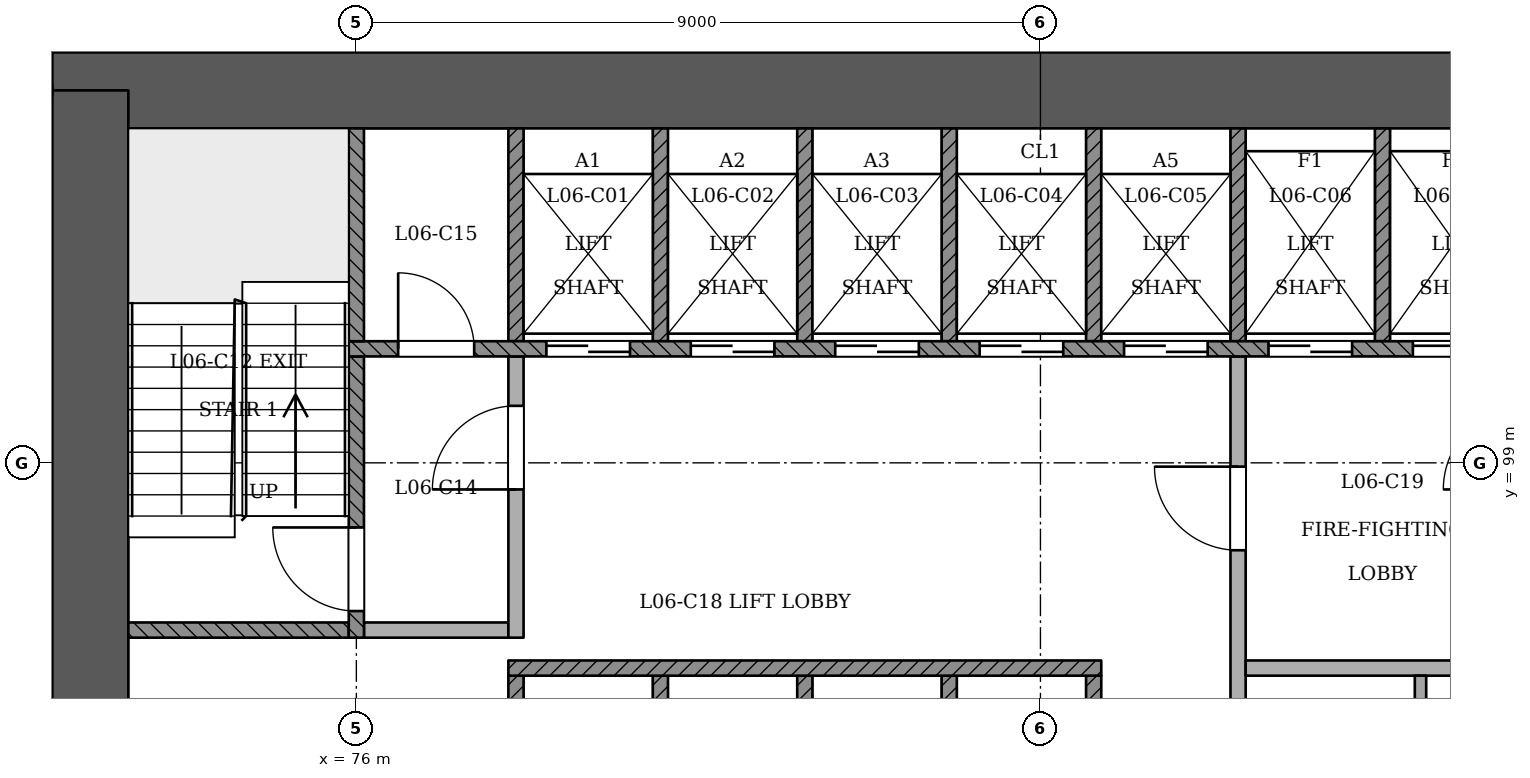
"""IFC4 building model, lengths in metres.
Left out: names, types, materials, properties, quantities, classifications, styles, units other than length and angle.
Written with IfcOpenShell. Run it as: python <this file> out.ifc"""

import sys

from ifc_helpers import new_model, si_unit, direction, frame, frame_2d, origin, place, context, subcontext, project, spatial, rectangle, extrude, element, fill, save


model = new_model("IFC4")
c1 = context("Model", 3, precision=1e-05, world=origin(), true_north=direction((0.0, 1.0)))
c2 = subcontext(c1, "Body", "Model", "MODEL_VIEW")
j1 = project(units=[si_unit("LENGTHUNIT", "METRE"), si_unit("PLANEANGLEUNIT", "RADIAN")], contexts=[c1])
p1 = place(None, origin())
s1 = spatial("IfcSite", under=j1, at=p1, CompositionType="ELEMENT")
p2 = place(p1, origin())
s2 = spatial("IfcBuilding", under=s1, at=p2, CompositionType="ELEMENT")
p3 = place(p2, frame((0.0, 0.0, 30.6)))
s3 = spatial("IfcBuildingStorey", under=s2, at=p3, CompositionType="ELEMENT", Elevation=30.6)
p4 = place(p3, frame((97.5, 103.9, 0.0), z_axis=(0.0, 0.0, 1.0), x_axis=(-1.0, 0.0, 0.0)))
e1 = element("IfcWall", 1, at=p4, inside=s3, PredefinedType="SHEAR", context=c2, shape_type="SweptSolid", body=[
    extrude(rectangle(XDim=25.5, YDim=1.0, at=frame_2d((12.75, 0.0))), origin(), (0.0, 0.0, 1.0), 3.6),
])
p5 = place(p3, frame((72.5, 103.9, 0.0), z_axis=(0.0, 0.0, 1.0), x_axis=(0.0, -1.0, 0.0)))
e2 = element("IfcWall", 2, at=p5, inside=s3, PredefinedType="SHEAR", context=c2, shape_type="SweptSolid", body=[
    extrude(rectangle(XDim=11.5, YDim=1.0, at=frame_2d((5.75, 0.0))), origin(), (0.0, 0.0, 1.0), 3.6),
])
p6 = place(p3, frame((61.273, 96.374, 0.0), z_axis=(0.0, 0.0, 1.0), x_axis=(0.5000018851, -0.866024315419, 0.0)))
e3 = element("IfcWall", 3, at=p6, inside=s3, PredefinedType="PARTITIONING", context=c2, shape_type="SweptSolid", body=[
    extrude(rectangle(XDim=45.0, YDim=0.15, at=frame_2d((22.5, 0.0))), origin(), (0.0, 0.0, 1.0), 2.7),
])
p7 = place(p6, frame((2.829, 0.0, 0.0)))
e4 = element("IfcOpeningElement", 4, at=p7, cuts=e3, PredefinedType="OPENING", context=c2, shape_type="SweptSolid", body=[
    extrude(rectangle(XDim=1.1, YDim=2.1, at=frame_2d((0.55, 1.05))), frame((0.0, 0.085, 0.0), z_axis=(0.0, -1.0, 0.0), x_axis=(1.0, 0.0, 0.0)), (0.0, 0.0, 1.0), 0.171),
])
p8 = place(p6, frame((7.3, 0.0, 0.0)))
e5 = element("IfcOpeningElement", 5, at=p8, cuts=e3, PredefinedType="OPENING", context=c2, shape_type="SweptSolid", body=[
    extrude(rectangle(XDim=1.2, YDim=2.1, at=frame_2d((0.6, 1.05))), frame((0.0, 0.085, 0.0), z_axis=(0.0, -1.0, 0.0), x_axis=(1.0, 0.0, 0.0)), (0.0, 0.0, 1.0), 0.171),
])
p9 = place(p6, frame((14.22, 0.0, 0.0)))
e6 = element("IfcOpeningElement", 6, at=p9, cuts=e3, PredefinedType="OPENING", context=c2, shape_type="SweptSolid", body=[
    extrude(rectangle(XDim=1.0, YDim=2.1, at=frame_2d((0.5, 1.05))), frame((0.0, 0.085, 0.0), z_axis=(0.0, -1.0, 0.0), x_axis=(1.0, 0.0, 0.0)), (0.0, 0.0, 1.0), 0.171),
])
p10 = place(p6, frame((20.895, 0.0, 0.0)))
e7 = element("IfcOpeningElement", 7, at=p10, cuts=e3, PredefinedType="OPENING", context=c2, shape_type="SweptSolid", body=[
    extrude(rectangle(XDim=1.0, YDim=2.1, at=frame_2d((0.5, 1.05))), frame((0.0, 0.085, 0.0), z_axis=(0.0, -1.0, 0.0), x_axis=(1.0, 0.0, 0.0)), (0.0, 0.0, 1.0), 0.171),
])
p11 = place(p6, frame((24.25, 0.0, 0.0)))
e8 = element("IfcOpeningElement", 8, at=p11, cuts=e3, PredefinedType="OPENING", context=c2, shape_type="SweptSolid", body=[
    extrude(rectangle(XDim=1.0, YDim=2.1, at=frame_2d((0.5, 1.05))), frame((0.0, 0.085, 0.0), z_axis=(0.0, -1.0, 0.0), x_axis=(1.0, 0.0, 0.0)), (0.0, 0.0, 1.0), 0.171),
])
p12 = place(p6, frame((29.78, 0.0, 0.0)))
e9 = element("IfcOpeningElement", 9, at=p12, cuts=e3, PredefinedType="OPENING", context=c2, shape_type="SweptSolid", body=[
    extrude(rectangle(XDim=1.0, YDim=2.1, at=frame_2d((0.5, 1.05))), frame((0.0, 0.085, 0.0), z_axis=(0.0, -1.0, 0.0), x_axis=(1.0, 0.0, 0.0)), (0.0, 0.0, 1.0), 0.171),
])
p13 = place(p6, frame((34.3, 0.0, 0.0)))
e10 = element("IfcOpeningElement", 10, at=p13, cuts=e3, PredefinedType="OPENING", context=c2, shape_type="SweptSolid", body=[
    extrude(rectangle(XDim=1.2, YDim=2.1, at=frame_2d((0.6, 1.05))), frame((0.0, 0.085, 0.0), z_axis=(0.0, -1.0, 0.0), x_axis=(1.0, 0.0, 0.0)), (0.0, 0.0, 1.0), 0.171),
])
p14 = place(p6, frame((41.22, 0.0, 0.0)))
e11 = element("IfcOpeningElement", 11, at=p14, cuts=e3, PredefinedType="OPENING", context=c2, shape_type="SweptSolid", body=[
    extrude(rectangle(XDim=1.0, YDim=2.1, at=frame_2d((0.5, 1.05))), frame((0.0, 0.085, 0.0), z_axis=(0.0, -1.0, 0.0), x_axis=(1.0, 0.0, 0.0)), (0.0, 0.0, 1.0), 0.171),
])
p15 = place(p3, frame((86.227, 57.403, 0.0), z_axis=(0.0, 0.0, 1.0), x_axis=(0.5000018851, 0.866024315419, 0.0)))
e12 = element("IfcWall", 12, at=p15, inside=s3, PredefinedType="PARTITIONING", context=c2, shape_type="SweptSolid", body=[
    extrude(rectangle(XDim=45.0, YDim=0.15, at=frame_2d((22.5, 0.0))), origin(), (0.0, 0.0, 1.0), 2.7),
])
p16 = place(p15, frame((0.72, 0.0, 0.0)))
e13 = element("IfcOpeningElement", 13, at=p16, cuts=e12, PredefinedType="OPENING", context=c2, shape_type="SweptSolid", body=[
    extrude(rectangle(XDim=1.0, YDim=2.1, at=frame_2d((0.5, 1.05))), frame((0.0, 0.085, 0.0), z_axis=(0.0, -1.0, 0.0), x_axis=(1.0, 0.0, 0.0)), (0.0, 0.0, 1.0), 0.171),
])
p17 = place(p15, frame((5.22, 0.0, 0.0)))
e14 = element("IfcOpeningElement", 14, at=p17, cuts=e12, PredefinedType="OPENING", context=c2, shape_type="SweptSolid", body=[
    extrude(rectangle(XDim=1.0, YDim=2.1, at=frame_2d((0.5, 1.05))), frame((0.0, 0.085, 0.0), z_axis=(0.0, -1.0, 0.0), x_axis=(1.0, 0.0, 0.0)), (0.0, 0.0, 1.0), 0.171),
])
p18 = place(p15, frame((11.78, 0.0, 0.0)))
e15 = element("IfcOpeningElement", 15, at=p18, cuts=e12, PredefinedType="OPENING", context=c2, shape_type="SweptSolid", body=[
    extrude(rectangle(XDim=1.0, YDim=2.1, at=frame_2d((0.5, 1.05))), frame((0.0, 0.085, 0.0), z_axis=(0.0, -1.0, 0.0), x_axis=(1.0, 0.0, 0.0)), (0.0, 0.0, 1.0), 0.171),
])
p19 = place(p15, frame((14.22, 0.0, 0.0)))
e16 = element("IfcOpeningElement", 16, at=p19, cuts=e12, PredefinedType="OPENING", context=c2, shape_type="SweptSolid", body=[
    extrude(rectangle(XDim=1.0, YDim=2.1, at=frame_2d((0.5, 1.05))), frame((0.0, 0.085, 0.0), z_axis=(0.0, -1.0, 0.0), x_axis=(1.0, 0.0, 0.0)), (0.0, 0.0, 1.0), 0.171),
])
p20 = place(p15, frame((19.75, 0.0, 0.0)))
e17 = element("IfcOpeningElement", 17, at=p20, cuts=e12, PredefinedType="OPENING", context=c2, shape_type="SweptSolid", body=[
    extrude(rectangle(XDim=1.0, YDim=2.1, at=frame_2d((0.5, 1.05))), frame((0.0, 0.085, 0.0), z_axis=(0.0, -1.0, 0.0), x_axis=(1.0, 0.0, 0.0)), (0.0, 0.0, 1.0), 0.171),
])
p21 = place(p15, frame((23.105, 0.0, 0.0)))
e18 = element("IfcOpeningElement", 18, at=p21, cuts=e12, PredefinedType="OPENING", context=c2, shape_type="SweptSolid", body=[
    extrude(rectangle(XDim=1.0, YDim=2.1, at=frame_2d((0.5, 1.05))), frame((0.0, 0.085, 0.0), z_axis=(0.0, -1.0, 0.0), x_axis=(1.0, 0.0, 0.0)), (0.0, 0.0, 1.0), 0.171),
])
p22 = place(p15, frame((28.75, 0.0, 0.0)))
e19 = element("IfcOpeningElement", 19, at=p22, cuts=e12, PredefinedType="OPENING", context=c2, shape_type="SweptSolid", body=[
    extrude(rectangle(XDim=1.0, YDim=2.1, at=frame_2d((0.5, 1.05))), frame((0.0, 0.085, 0.0), z_axis=(0.0, -1.0, 0.0), x_axis=(1.0, 0.0, 0.0)), (0.0, 0.0, 1.0), 0.171),
])
p23 = place(p15, frame((32.105, 0.0, 0.0)))
e20 = element("IfcOpeningElement", 20, at=p23, cuts=e12, PredefinedType="OPENING", context=c2, shape_type="SweptSolid", body=[
    extrude(rectangle(XDim=1.0, YDim=2.1, at=frame_2d((0.5, 1.05))), frame((0.0, 0.085, 0.0), z_axis=(0.0, -1.0, 0.0), x_axis=(1.0, 0.0, 0.0)), (0.0, 0.0, 1.0), 0.171),
])
p24 = place(p15, frame((36.504, 0.0, 0.0)))
e21 = element("IfcOpeningElement", 21, at=p24, cuts=e12, PredefinedType="OPENING", context=c2, shape_type="SweptSolid", body=[
    extrude(rectangle(XDim=1.0, YDim=2.1, at=frame_2d((0.5, 1.05))), frame((0.0, 0.085, 0.0), z_axis=(0.0, -1.0, 0.0), x_axis=(1.0, 0.0, 0.0)), (0.0, 0.0, 1.0), 0.171),
])
p25 = place(p15, frame((38.654, 0.0, 0.0)))
e22 = element("IfcOpeningElement", 22, at=p25, cuts=e12, PredefinedType="OPENING", context=c2, shape_type="SweptSolid", body=[
    extrude(rectangle(XDim=1.0, YDim=2.1, at=frame_2d((0.5, 1.05))), frame((0.0, 0.085, 0.0), z_axis=(0.0, -1.0, 0.0), x_axis=(1.0, 0.0, 0.0)), (0.0, 0.0, 1.0), 0.171),
])
p26 = place(p15, frame((41.071, 0.0, 0.0)))
e23 = element("IfcOpeningElement", 23, at=p26, cuts=e12, PredefinedType="OPENING", context=c2, shape_type="SweptSolid", body=[
    extrude(rectangle(XDim=1.1, YDim=2.1, at=frame_2d((0.55, 1.05))), frame((0.0, 0.085, 0.0), z_axis=(0.0, -1.0, 0.0), x_axis=(1.0, 0.0, 0.0)), (0.0, 0.0, 1.0), 0.171),
])
for number, where, z_axis, x_axis in (
    (24, (78.1, 93.4, 0.0), (0.0, 0.0, 1.0), (0.0, 1.0, 0.0)),
    (25, (80.0, 93.4, 0.0), (0.0, 0.0, 1.0), (0.0, 1.0, 0.0)),
    (26, (81.9, 93.4, 0.0), (0.0, 0.0, 1.0), (0.0, 1.0, 0.0)),
    (27, (83.8, 93.4, 0.0), (0.0, 0.0, 1.0), (0.0, 1.0, 0.0)),
    (28, (85.7, 93.4, 0.0), (0.0, 0.0, 1.0), (0.0, 1.0, 0.0)),
):
    element("IfcWall", number, at=place(p3, frame(where, z_axis=z_axis, x_axis=x_axis)), inside=s3, PredefinedType="SOLIDWALL", context=c2, shape_type="SweptSolid", body=[
        extrude(rectangle(XDim=2.8, YDim=0.2, at=frame_2d((1.4, 0.0))), origin(), (0.0, 0.0, 1.0), 3.1),
    ])
p27 = place(p3, frame((87.6, 93.4, 0.0), z_axis=(0.0, 0.0, 1.0), x_axis=(0.0, 1.0, 0.0)))
e29 = element("IfcWall", 29, at=p27, inside=s3, PredefinedType="PARTITIONING", context=c2, shape_type="SweptSolid", body=[
    extrude(rectangle(XDim=7.0, YDim=0.2, at=frame_2d((3.5, 0.0))), origin(), (0.0, 0.0, 1.0), 3.1),
])
p28 = place(p27, frame((4.45, 0.0, 0.0)))
e30 = element("IfcOpeningElement", 30, at=p28, cuts=e29, PredefinedType="OPENING", context=c2, shape_type="SweptSolid", body=[
    extrude(rectangle(XDim=1.1, YDim=2.1, at=frame_2d((0.55, 1.05))), frame((0.0, 0.11, 0.0), z_axis=(0.0, -1.0, 0.0), x_axis=(1.0, 0.0, 0.0)), (0.0, 0.0, 1.0), 0.221),
])
p29 = place(p3, frame((90.0, 93.4, 0.0), z_axis=(0.0, 0.0, 1.0), x_axis=(0.0, 1.0, 0.0)))
e31 = element("IfcWall", 31, at=p29, inside=s3, PredefinedType="PARTITIONING", context=c2, shape_type="SweptSolid", body=[
    extrude(rectangle(XDim=2.8, YDim=0.15, at=frame_2d((1.4, 0.0))), origin(), (0.0, 0.0, 1.0), 3.1),
])
p30 = place(p3, frame((78.0, 96.3, 0.0), z_axis=(0.0, 0.0, 1.0), x_axis=(1.0, 0.0, 0.0)))
e32 = element("IfcWall", 32, at=p30, inside=s3, PredefinedType="SOLIDWALL", context=c2, shape_type="SweptSolid", body=[
    extrude(rectangle(XDim=7.8, YDim=0.2, at=frame_2d((3.9, 0.0))), origin(), (0.0, 0.0, 1.0), 3.1),
])
p31 = place(p3, frame((87.7, 96.3, 0.0), z_axis=(0.0, 0.0, 1.0), x_axis=(1.0, 0.0, 0.0)))
e33 = element("IfcWall", 33, at=p31, inside=s3, PredefinedType="PARTITIONING", context=c2, shape_type="SweptSolid", body=[
    extrude(rectangle(XDim=3.6, YDim=0.2, at=frame_2d((1.8, 0.0))), origin(), (0.0, 0.0, 1.0), 3.1),
])
p32 = place(p3, frame((73.0, 96.8, 0.0), z_axis=(0.0, 0.0, 1.0), x_axis=(1.0, 0.0, 0.0)))
e34 = element("IfcWall", 34, at=p32, inside=s3, PredefinedType="SOLIDWALL", context=c2, shape_type="SweptSolid", body=[
    extrude(rectangle(XDim=2.9, YDim=0.2, at=frame_2d((1.45, 0.0))), origin(), (0.0, 0.0, 1.0), 3.1),
])
p33 = place(p3, frame((76.0, 96.7, 0.0), z_axis=(0.0, 0.0, 1.0), x_axis=(0.0, 1.0, 0.0)))
e35 = element("IfcWall", 35, at=p33, inside=s3, PredefinedType="SOLIDWALL", context=c2, shape_type="SweptSolid", body=[
    extrude(rectangle(XDim=3.7, YDim=0.2, at=frame_2d((1.85, 0.0))), origin(), (0.0, 0.0, 1.0), 3.1),
])
p34 = place(p33, frame((0.35, 0.0, 0.0)))
e36 = element("IfcOpeningElement", 36, at=p34, cuts=e35, PredefinedType="OPENING", context=c2, shape_type="SweptSolid", body=[
    extrude(rectangle(XDim=1.1, YDim=2.1, at=frame_2d((0.55, 1.05))), frame((0.0, 0.11, 0.0), z_axis=(0.0, -1.0, 0.0), x_axis=(1.0, 0.0, 0.0)), (0.0, 0.0, 1.0), 0.221),
])
p35 = place(p3, frame((76.1, 96.8, 0.0), z_axis=(0.0, 0.0, 1.0), x_axis=(1.0, 0.0, 0.0)))
e37 = element("IfcWall", 37, at=p35, inside=s3, PredefinedType="PARTITIONING", context=c2, shape_type="SweptSolid", body=[
    extrude(rectangle(XDim=1.9, YDim=0.2, at=frame_2d((0.95, 0.0))), origin(), (0.0, 0.0, 1.0), 3.1),
])
p36 = place(p3, frame((78.1, 96.7, 0.0), z_axis=(0.0, 0.0, 1.0), x_axis=(0.0, 1.0, 0.0)))
e38 = element("IfcWall", 38, at=p36, inside=s3, PredefinedType="PARTITIONING", context=c2, shape_type="SweptSolid", body=[
    extrude(rectangle(XDim=3.7, YDim=0.2, at=frame_2d((1.85, 0.0))), origin(), (0.0, 0.0, 1.0), 3.1),
])
p37 = place(p36, frame((1.95, 0.0, 0.0)))
e39 = element("IfcOpeningElement", 39, at=p37, cuts=e38, PredefinedType="OPENING", context=c2, shape_type="SweptSolid", body=[
    extrude(rectangle(XDim=1.1, YDim=2.1, at=frame_2d((0.55, 1.05))), frame((0.0, 0.11, 0.0), z_axis=(0.0, -1.0, 0.0), x_axis=(1.0, 0.0, 0.0)), (0.0, 0.0, 1.0), 0.221),
])
p38 = place(p3, frame((75.9, 100.5, 0.0), z_axis=(0.0, 0.0, 1.0), x_axis=(1.0, 0.0, 0.0)))
e40 = element("IfcWall", 40, at=p38, inside=s3, PredefinedType="SOLIDWALL", context=c2, shape_type="SweptSolid", body=[
    extrude(rectangle(XDim=18.2, YDim=0.2, at=frame_2d((9.1, 0.0))), origin(), (0.0, 0.0, 1.0), 3.1),
])
p39 = place(p38, frame((2.6, 0.0, 0.0)))
e41 = element("IfcOpeningElement", 41, at=p39, cuts=e40, PredefinedType="OPENING", context=c2, shape_type="SweptSolid", body=[
    extrude(rectangle(XDim=1.1, YDim=2.1, at=frame_2d((0.55, 1.05))), frame((0.0, 0.11, 0.0), z_axis=(0.0, -1.0, 0.0), x_axis=(1.0, 0.0, 0.0)), (0.0, 0.0, 1.0), 0.221),
])
p40 = place(p38, frame((4.5, 0.0, 0.0)))
e42 = element("IfcOpeningElement", 42, at=p40, cuts=e40, PredefinedType="OPENING", context=c2, shape_type="SweptSolid", body=[
    extrude(rectangle(XDim=1.1, YDim=2.1, at=frame_2d((0.55, 1.05))), frame((0.0, 0.11, 0.0), z_axis=(0.0, -1.0, 0.0), x_axis=(1.0, 0.0, 0.0)), (0.0, 0.0, 1.0), 0.221),
])
p41 = place(p38, frame((6.4, 0.0, 0.0)))
e43 = element("IfcOpeningElement", 43, at=p41, cuts=e40, PredefinedType="OPENING", context=c2, shape_type="SweptSolid", body=[
    extrude(rectangle(XDim=1.1, YDim=2.1, at=frame_2d((0.55, 1.05))), frame((0.0, 0.11, 0.0), z_axis=(0.0, -1.0, 0.0), x_axis=(1.0, 0.0, 0.0)), (0.0, 0.0, 1.0), 0.221),
])
p42 = place(p38, frame((8.3, 0.0, 0.0)))
e44 = element("IfcOpeningElement", 44, at=p42, cuts=e40, PredefinedType="OPENING", context=c2, shape_type="SweptSolid", body=[
    extrude(rectangle(XDim=1.1, YDim=2.1, at=frame_2d((0.55, 1.05))), frame((0.0, 0.11, 0.0), z_axis=(0.0, -1.0, 0.0), x_axis=(1.0, 0.0, 0.0)), (0.0, 0.0, 1.0), 0.221),
])
p43 = place(p38, frame((10.2, 0.0, 0.0)))
e45 = element("IfcOpeningElement", 45, at=p43, cuts=e40, PredefinedType="OPENING", context=c2, shape_type="SweptSolid", body=[
    extrude(rectangle(XDim=1.1, YDim=2.1, at=frame_2d((0.55, 1.05))), frame((0.0, 0.11, 0.0), z_axis=(0.0, -1.0, 0.0), x_axis=(1.0, 0.0, 0.0)), (0.0, 0.0, 1.0), 0.221),
])
p44 = place(p38, frame((12.1, 0.0, 0.0)))
e46 = element("IfcOpeningElement", 46, at=p44, cuts=e40, PredefinedType="OPENING", context=c2, shape_type="SweptSolid", body=[
    extrude(rectangle(XDim=1.1, YDim=2.1, at=frame_2d((0.55, 1.05))), frame((0.0, 0.11, 0.0), z_axis=(0.0, -1.0, 0.0), x_axis=(1.0, 0.0, 0.0)), (0.0, 0.0, 1.0), 0.221),
])
p45 = place(p38, frame((14.0, 0.0, 0.0)))
e47 = element("IfcOpeningElement", 47, at=p45, cuts=e40, PredefinedType="OPENING", context=c2, shape_type="SweptSolid", body=[
    extrude(rectangle(XDim=1.1, YDim=2.1, at=frame_2d((0.55, 1.05))), frame((0.0, 0.11, 0.0), z_axis=(0.0, -1.0, 0.0), x_axis=(1.0, 0.0, 0.0)), (0.0, 0.0, 1.0), 0.221),
])
p46 = place(p38, frame((0.65, 0.0, 0.0)))
e48 = element("IfcOpeningElement", 48, at=p46, cuts=e40, PredefinedType="OPENING", context=c2, shape_type="SweptSolid", body=[
    extrude(rectangle(XDim=1.0, YDim=2.1, at=frame_2d((0.5, 1.05))), frame((0.0, 0.11, 0.0), z_axis=(0.0, -1.0, 0.0), x_axis=(1.0, 0.0, 0.0)), (0.0, 0.0, 1.0), 0.221),
])
p47 = place(p38, frame((16.3, 0.0, 0.0)))
e49 = element("IfcOpeningElement", 49, at=p47, cuts=e40, PredefinedType="OPENING", context=c2, shape_type="SweptSolid", body=[
    extrude(rectangle(XDim=1.0, YDim=2.1, at=frame_2d((0.5, 1.05))), frame((0.0, 0.11, 0.0), z_axis=(0.0, -1.0, 0.0), x_axis=(1.0, 0.0, 0.0)), (0.0, 0.0, 1.0), 0.221),
])
for number, where, z_axis, x_axis in (
    (50, (76.0, 100.6, 0.0), (0.0, 0.0, 1.0), (0.0, 1.0, 0.0)),
    (51, (78.1, 100.6, 0.0), (0.0, 0.0, 1.0), (0.0, 1.0, 0.0)),
    (52, (80.0, 100.6, 0.0), (0.0, 0.0, 1.0), (0.0, 1.0, 0.0)),
    (53, (81.9, 100.6, 0.0), (0.0, 0.0, 1.0), (0.0, 1.0, 0.0)),
    (54, (83.8, 100.6, 0.0), (0.0, 0.0, 1.0), (0.0, 1.0, 0.0)),
    (55, (85.7, 100.6, 0.0), (0.0, 0.0, 1.0), (0.0, 1.0, 0.0)),
    (56, (87.6, 100.6, 0.0), (0.0, 0.0, 1.0), (0.0, 1.0, 0.0)),
    (57, (89.5, 100.6, 0.0), (0.0, 0.0, 1.0), (0.0, 1.0, 0.0)),
):
    element("IfcWall", number, at=place(p3, frame(where, z_axis=z_axis, x_axis=x_axis)), inside=s3, PredefinedType="SOLIDWALL", context=c2, shape_type="SweptSolid", body=[
        extrude(rectangle(XDim=2.8, YDim=0.2, at=frame_2d((1.4, 0.0))), origin(), (0.0, 0.0, 1.0), 3.1),
    ])
p48 = place(p39, origin())
e58 = element("IfcDoor", 58, at=p48, inside=s3, OperationType="SLIDING_TO_RIGHT", PredefinedType="NOTDEFINED", context=c2, shape_type="SweptSolid", body=[
    extrude(rectangle(XDim=1.1, YDim=2.1, at=frame_2d((0.55, 1.05))), frame((0.0, 0.025, 0.0), z_axis=(0.0, -1.0, 0.0), x_axis=(1.0, 0.0, 0.0)), (0.0, 0.0, 1.0), 0.05),
])
fill(e41, e58)
p49 = place(p40, origin())
e59 = element("IfcDoor", 59, at=p49, inside=s3, OperationType="SLIDING_TO_LEFT", PredefinedType="NOTDEFINED", context=c2, shape_type="SweptSolid", body=[
    extrude(rectangle(XDim=1.1, YDim=2.1, at=frame_2d((0.55, 1.05))), frame((0.0, 0.025, 0.0), z_axis=(0.0, -1.0, 0.0), x_axis=(1.0, 0.0, 0.0)), (0.0, 0.0, 1.0), 0.05),
])
fill(e42, e59)
p50 = place(p41, origin())
e60 = element("IfcDoor", 60, at=p50, inside=s3, OperationType="SLIDING_TO_RIGHT", PredefinedType="NOTDEFINED", context=c2, shape_type="SweptSolid", body=[
    extrude(rectangle(XDim=1.1, YDim=2.1, at=frame_2d((0.55, 1.05))), frame((0.0, 0.025, 0.0), z_axis=(0.0, -1.0, 0.0), x_axis=(1.0, 0.0, 0.0)), (0.0, 0.0, 1.0), 0.05),
])
fill(e43, e60)
p51 = place(p42, origin())
e61 = element("IfcDoor", 61, at=p51, inside=s3, OperationType="SLIDING_TO_LEFT", PredefinedType="NOTDEFINED", context=c2, shape_type="SweptSolid", body=[
    extrude(rectangle(XDim=1.1, YDim=2.1, at=frame_2d((0.55, 1.05))), frame((0.0, 0.025, 0.0), z_axis=(0.0, -1.0, 0.0), x_axis=(1.0, 0.0, 0.0)), (0.0, 0.0, 1.0), 0.05),
])
fill(e44, e61)
p52 = place(p43, origin())
e62 = element("IfcDoor", 62, at=p52, inside=s3, OperationType="SLIDING_TO_RIGHT", PredefinedType="NOTDEFINED", context=c2, shape_type="SweptSolid", body=[
    extrude(rectangle(XDim=1.1, YDim=2.1, at=frame_2d((0.55, 1.05))), frame((0.0, 0.025, 0.0), z_axis=(0.0, -1.0, 0.0), x_axis=(1.0, 0.0, 0.0)), (0.0, 0.0, 1.0), 0.05),
])
fill(e45, e62)
p53 = place(p44, origin())
e63 = element("IfcDoor", 63, at=p53, inside=s3, OperationType="SLIDING_TO_RIGHT", PredefinedType="NOTDEFINED", context=c2, shape_type="SweptSolid", body=[
    extrude(rectangle(XDim=1.1, YDim=2.1, at=frame_2d((0.55, 1.05))), frame((0.0, 0.025, 0.0), z_axis=(0.0, -1.0, 0.0), x_axis=(1.0, 0.0, 0.0)), (0.0, 0.0, 1.0), 0.05),
])
fill(e46, e63)
p54 = place(p45, origin())
e64 = element("IfcDoor", 64, at=p54, inside=s3, OperationType="SLIDING_TO_LEFT", PredefinedType="NOTDEFINED", context=c2, shape_type="SweptSolid", body=[
    extrude(rectangle(XDim=1.1, YDim=2.1, at=frame_2d((0.55, 1.05))), frame((0.0, 0.025, 0.0), z_axis=(0.0, -1.0, 0.0), x_axis=(1.0, 0.0, 0.0)), (0.0, 0.0, 1.0), 0.05),
])
fill(e47, e64)
p55 = place(p34, origin())
e65 = element("IfcDoor", 65, at=p55, inside=s3, OperationType="SINGLE_SWING_RIGHT", PredefinedType="NOTDEFINED", context=c2, shape_type="SweptSolid", body=[
    extrude(rectangle(XDim=1.1, YDim=2.1, at=frame_2d((0.55, 1.05))), frame((0.0, 0.025, 0.0), z_axis=(0.0, -1.0, 0.0), x_axis=(1.0, 0.0, 0.0)), (0.0, 0.0, 1.0), 0.05),
])
fill(e36, e65)
p56 = place(p37, origin())
e66 = element("IfcDoor", 66, at=p56, inside=s3, OperationType="SINGLE_SWING_LEFT", PredefinedType="NOTDEFINED", context=c2, shape_type="SweptSolid", body=[
    extrude(rectangle(XDim=1.1, YDim=2.1, at=frame_2d((0.55, 1.05))), frame((0.0, 0.025, 0.0), z_axis=(0.0, -1.0, 0.0), x_axis=(1.0, 0.0, 0.0)), (0.0, 0.0, 1.0), 0.05),
])
fill(e39, e66)
p57 = place(p28, origin())
e67 = element("IfcDoor", 67, at=p57, inside=s3, OperationType="SINGLE_SWING_RIGHT", PredefinedType="NOTDEFINED", context=c2, shape_type="SweptSolid", body=[
    extrude(rectangle(XDim=1.1, YDim=2.1, at=frame_2d((0.55, 1.05))), frame((0.0, 0.025, 0.0), z_axis=(0.0, -1.0, 0.0), x_axis=(1.0, 0.0, 0.0)), (0.0, 0.0, 1.0), 0.05),
])
fill(e30, e67)
p58 = place(p46, origin())
e68 = element("IfcDoor", 68, at=p58, inside=s3, OperationType="SINGLE_SWING_LEFT", PredefinedType="NOTDEFINED", context=c2, shape_type="SweptSolid", body=[
    extrude(rectangle(XDim=1.0, YDim=2.1, at=frame_2d((0.5, 1.05))), frame((0.0, 0.025, 0.0), z_axis=(0.0, -1.0, 0.0), x_axis=(1.0, 0.0, 0.0)), (0.0, 0.0, 1.0), 0.05),
])
fill(e48, e68)
save(model, sys.argv[1])
